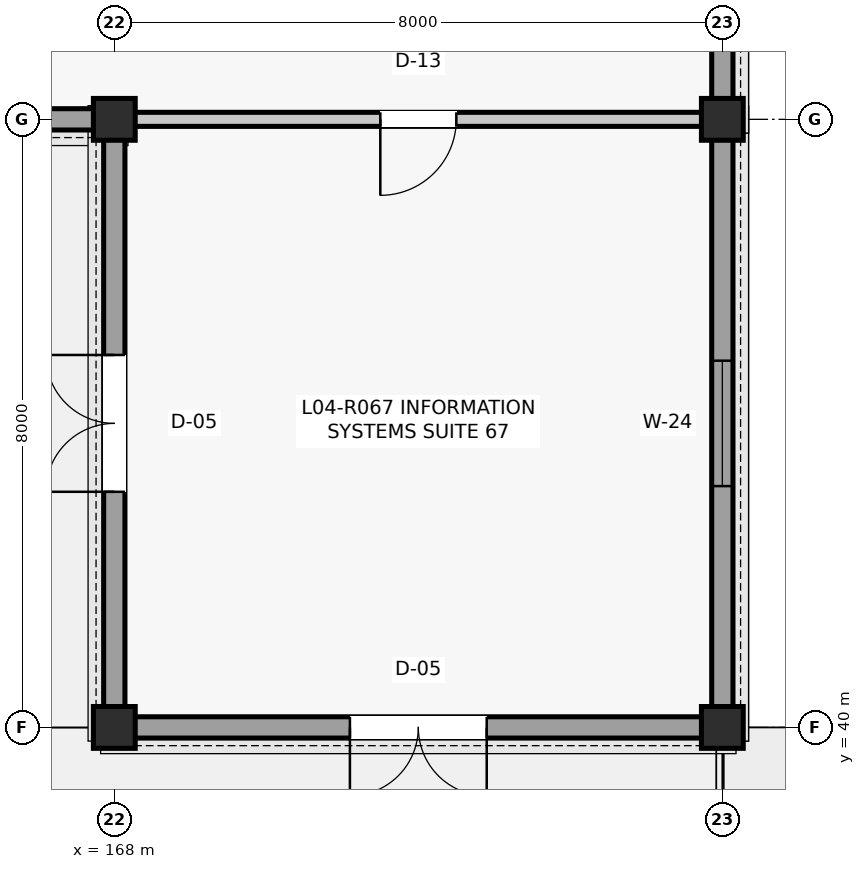
"""IFC4 building model, lengths in metres.
Left out: names, types, materials, properties, quantities, classifications, styles, units other than length and angle.
Written with IfcOpenShell. Run it as: python <this file> out.ifc"""

import sys

from ifc_helpers import new_model, si_unit, direction, frame, frame_2d, origin, origin_2d, place, context, subcontext, project, spatial, rectangle, extrude, element, fill, save


model = new_model("IFC4")
c1 = context("Model", 3, precision=1e-05, world=origin(), true_north=direction((0.0, 1.0)))
c2 = subcontext(c1, "Body", "Model", "MODEL_VIEW")
j1 = project(units=[si_unit("LENGTHUNIT", "METRE"), si_unit("PLANEANGLEUNIT", "RADIAN")], contexts=[c1])
p1 = place(None, origin())
s1 = spatial("IfcSite", under=j1, at=p1, CompositionType="ELEMENT")
p2 = place(p1, origin())
s2 = spatial("IfcBuilding", under=s1, at=p2, CompositionType="ELEMENT")
p3 = place(p2, frame((0.0, 0.0, 17.82)))
s3 = spatial("IfcBuildingStorey", under=s2, at=p3, CompositionType="ELEMENT", Elevation=17.82)
for number, where, z_axis, x_axis in (
    (1, (168.0, 40.0, 0.0), (0.0, 0.0, 1.0), (1.0, 0.0, 0.0)),
    (2, (168.0, 48.0, 0.0), (0.0, 0.0, 1.0), (1.0, 0.0, 0.0)),
    (3, (176.0, 40.0, 0.0), (0.0, 0.0, 1.0), (1.0, 0.0, 0.0)),
    (4, (176.0, 48.0, 0.0), (0.0, 0.0, 1.0), (1.0, 0.0, 0.0)),
):
    element("IfcColumn", number, at=place(p3, frame(where, z_axis=z_axis, x_axis=x_axis)), inside=s3, PredefinedType="COLUMN", context=c2, shape_type="SweptSolid", body=[
        extrude(rectangle(XDim=0.55, YDim=0.55, at=origin_2d()), origin(), (0.0, 0.0, 1.0), 3.96),
    ])
p4 = place(p3, frame((160.26, 48.0, 0.0), z_axis=(0.0, 0.0, 1.0), x_axis=(1.0, 0.0, 0.0)))
e5 = element("IfcWall", 5, at=p4, inside=s3, PredefinedType="SOLIDWALL", context=c2, shape_type="SweptSolid", body=[
    extrude(rectangle(XDim=7.48, YDim=0.28, at=frame_2d((3.74, 0.0))), origin(), (0.0, 0.0, 1.0), 3.289),
])
p5 = place(p4, frame((2.84, 0.0, 0.0)))
e6 = element("IfcOpeningElement", 6, at=p5, cuts=e5, PredefinedType="OPENING", context=c2, shape_type="SweptSolid", body=[
    extrude(rectangle(XDim=1.8, YDim=2.25, at=frame_2d((0.9, 1.125))), frame((0.0, 0.15, 0.0), z_axis=(0.0, -1.0, 0.0), x_axis=(1.0, 0.0, 0.0)), (0.0, 0.0, 1.0), 0.3),
])
p6 = place(p3, frame((168.26, 40.0, 0.0), z_axis=(0.0, 0.0, 1.0), x_axis=(1.0, 0.0, 0.0)))
e7 = element("IfcWall", 7, at=p6, inside=s3, PredefinedType="SOLIDWALL", context=c2, shape_type="SweptSolid", body=[
    extrude(rectangle(XDim=7.48, YDim=0.28, at=frame_2d((3.74, 0.0))), origin(), (0.0, 0.0, 1.0), 3.289),
])
p7 = place(p6, frame((2.84, 0.0, 0.0)))
e8 = element("IfcOpeningElement", 8, at=p7, cuts=e7, PredefinedType="OPENING", context=c2, shape_type="SweptSolid", body=[
    extrude(rectangle(XDim=1.8, YDim=2.25, at=frame_2d((0.9, 1.125))), frame((0.0, 0.15, 0.0), z_axis=(0.0, -1.0, 0.0), x_axis=(1.0, 0.0, 0.0)), (0.0, 0.0, 1.0), 0.3),
])
p8 = place(p3, frame((168.0, 40.26, 0.0), z_axis=(0.0, 0.0, 1.0), x_axis=(0.0, 1.0, 0.0)))
e9 = element("IfcWall", 9, at=p8, inside=s3, PredefinedType="SOLIDWALL", context=c2, shape_type="SweptSolid", body=[
    extrude(rectangle(XDim=7.48, YDim=0.28, at=frame_2d((3.74, 0.0))), origin(), (0.0, 0.0, 1.0), 3.289),
])
p9 = place(p8, frame((2.84, 0.0, 0.0)))
e10 = element("IfcOpeningElement", 10, at=p9, cuts=e9, PredefinedType="OPENING", context=c2, shape_type="SweptSolid", body=[
    extrude(rectangle(XDim=1.8, YDim=2.25, at=frame_2d((0.9, 1.125))), frame((0.0, 0.15, 0.0), z_axis=(0.0, -1.0, 0.0), x_axis=(1.0, 0.0, 0.0)), (0.0, 0.0, 1.0), 0.3),
])
p10 = place(p3, frame((176.0, 40.26, 0.0), z_axis=(0.0, 0.0, 1.0), x_axis=(0.0, 1.0, 0.0)))
e11 = element("IfcWall", 11, at=p10, inside=s3, PredefinedType="SOLIDWALL", context=c2, shape_type="SweptSolid", body=[
    extrude(rectangle(XDim=7.48, YDim=0.28, at=frame_2d((3.74, 0.0))), origin(), (0.0, 0.0, 1.0), 3.352),
])
p11 = place(p10, frame((2.915, 0.0, 0.9)))
e12 = element("IfcOpeningElement", 12, at=p11, cuts=e11, PredefinedType="OPENING", context=c2, shape_type="SweptSolid", body=[
    extrude(rectangle(XDim=1.65, YDim=1.75, at=frame_2d((0.825, 0.875))), frame((0.0, 0.15, 0.0), z_axis=(0.0, -1.0, 0.0), x_axis=(1.0, 0.0, 0.0)), (0.0, 0.0, 1.0), 0.3),
])
p12 = place(p3, frame((176.0, 48.26, 0.0), z_axis=(0.0, 0.0, 1.0), x_axis=(0.0, 1.0, 0.0)))
e13 = element("IfcWall", 13, at=p12, inside=s3, PredefinedType="SOLIDWALL", context=c2, shape_type="SweptSolid", body=[
    extrude(rectangle(XDim=7.48, YDim=0.28, at=frame_2d((3.74, 0.0))), origin(), (0.0, 0.0, 1.0), 3.285),
])
p13 = place(p12, frame((0.671, 0.0, 0.95)))
e14 = element("IfcOpeningElement", 14, at=p13, cuts=e13, PredefinedType="OPENING", context=c2, shape_type="SweptSolid", body=[
    extrude(rectangle(XDim=1.35, YDim=1.9, at=frame_2d((0.675, 0.95))), frame((0.0, 0.15, 0.0), z_axis=(0.0, -1.0, 0.0), x_axis=(1.0, 0.0, 0.0)), (0.0, 0.0, 1.0), 0.3),
])
p14 = place(p12, frame((5.458, 0.0, 0.95)))
e15 = element("IfcOpeningElement", 15, at=p14, cuts=e13, PredefinedType="OPENING", context=c2, shape_type="SweptSolid", body=[
    extrude(rectangle(XDim=1.35, YDim=1.9, at=frame_2d((0.675, 0.95))), frame((0.0, 0.15, 0.0), z_axis=(0.0, -1.0, 0.0), x_axis=(1.0, 0.0, 0.0)), (0.0, 0.0, 1.0), 0.3),
])
p15 = place(p3, frame((168.265, 48.0, 0.0), z_axis=(0.0, 0.0, 1.0), x_axis=(1.0, 0.0, 0.0)))
e16 = element("IfcWall", 16, at=p15, inside=s3, PredefinedType="PARTITIONING", context=c2, shape_type="SweptSolid", body=[
    extrude(rectangle(XDim=7.47, YDim=0.185, at=frame_2d((3.735, 0.0))), origin(), (0.0, 0.0, 1.0), 3.437),
])
p16 = place(p15, frame((3.235, 0.0, 0.0)))
e17 = element("IfcOpeningElement", 17, at=p16, cuts=e16, PredefinedType="OPENING", context=c2, shape_type="SweptSolid", body=[
    extrude(rectangle(XDim=1.0, YDim=2.15, at=frame_2d((0.5, 1.075))), frame((0.0, 0.103, 0.0), z_axis=(0.0, -1.0, 0.0), x_axis=(1.0, 0.0, 0.0)), (0.0, 0.0, 1.0), 0.205),
])
p17 = place(p7, frame((1.8, 0.0, 0.0), z_axis=(0.0, 0.0, 1.0), x_axis=(-1.0, 0.0, 0.0)))
e18 = element("IfcDoor", 18, at=p17, inside=s3, OperationType="DOUBLE_DOOR_SINGLE_SWING", PredefinedType="DOOR", context=c2, shape_type="SweptSolid", body=[
    extrude(rectangle(XDim=1.8, YDim=2.25, at=frame_2d((0.9, 1.125))), frame((0.0, 0.025, 0.0), z_axis=(0.0, -1.0, 0.0), x_axis=(1.0, 0.0, 0.0)), (0.0, 0.0, 1.0), 0.05),
])
fill(e8, e18)
p18 = place(p9, origin())
e19 = element("IfcDoor", 19, at=p18, inside=s3, OperationType="DOUBLE_DOOR_SINGLE_SWING", PredefinedType="DOOR", context=c2, shape_type="SweptSolid", body=[
    extrude(rectangle(XDim=1.8, YDim=2.25, at=frame_2d((0.9, 1.125))), frame((0.0, 0.025, 0.0), z_axis=(0.0, -1.0, 0.0), x_axis=(1.0, 0.0, 0.0)), (0.0, 0.0, 1.0), 0.05),
])
fill(e10, e19)
p19 = place(p11, origin())
e20 = element("IfcWindow", 20, at=p19, inside=s3, PartitioningType="SINGLE_PANEL", PredefinedType="WINDOW", context=c2, shape_type="SweptSolid", body=[
    extrude(rectangle(XDim=1.65, YDim=1.75, at=frame_2d((0.825, 0.875))), frame((0.0, 0.03, 0.0), z_axis=(0.0, -1.0, 0.0), x_axis=(1.0, 0.0, 0.0)), (0.0, 0.0, 1.0), 0.06),
])
fill(e12, e20)
p20 = place(p16, frame((1.0, 0.0, 0.0), z_axis=(0.0, 0.0, 1.0), x_axis=(-1.0, 0.0, 0.0)))
e21 = element("IfcDoor", 21, at=p20, inside=s3, OperationType="SINGLE_SWING_LEFT", PredefinedType="DOOR", context=c2, shape_type="SweptSolid", body=[
    extrude(rectangle(XDim=1.0, YDim=2.15, at=frame_2d((0.5, 1.075))), frame((0.0, 0.025, 0.0), z_axis=(0.0, -1.0, 0.0), x_axis=(1.0, 0.0, 0.0)), (0.0, 0.0, 1.0), 0.05),
])
fill(e17, e21)
save(model, sys.argv[1])
